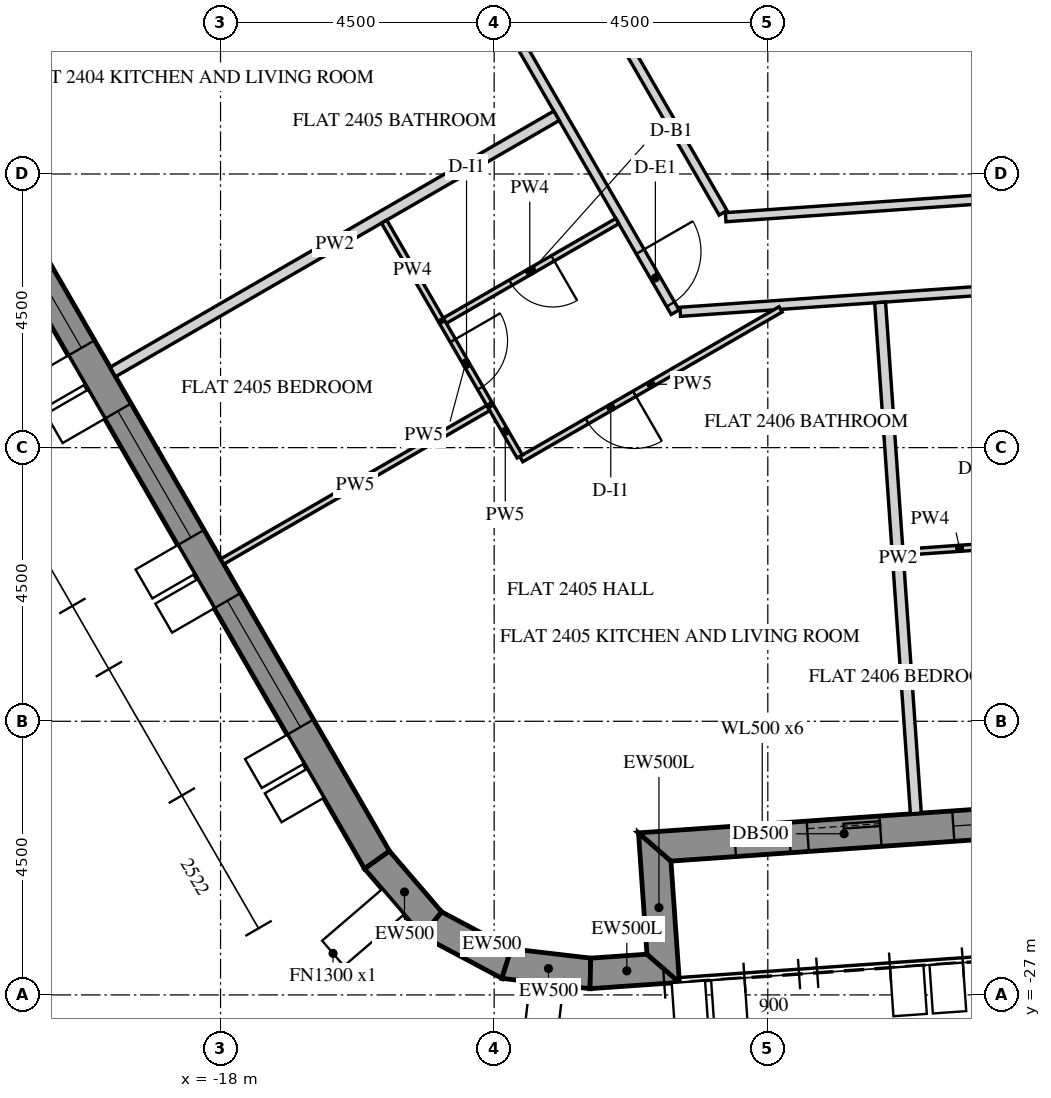
"""IFC4 building model, lengths in metres.
Left out: names, types, materials, properties, quantities, classifications, styles, units other than length and angle.
Written with IfcOpenShell. Run it as: python <this file> out.ifc"""

import sys

from ifc_helpers import new_model, si_unit, direction, frame, frame_2d, origin, place, context, subcontext, project, spatial, polyline, rectangle, outline, extrude, element, fill, save


model = new_model("IFC4")
c1 = context("Model", 3, precision=1e-05, world=origin(), true_north=direction((0.0, 1.0)))
c2 = subcontext(c1, "Body", "Model", "MODEL_VIEW")
j1 = project(units=[si_unit("LENGTHUNIT", "METRE"), si_unit("PLANEANGLEUNIT", "RADIAN")], contexts=[c1])
p1 = place(None, origin())
s1 = spatial("IfcSite", under=j1, at=p1, CompositionType="ELEMENT")
p2 = place(p1, origin())
s2 = spatial("IfcBuilding", under=s1, at=p2, CompositionType="ELEMENT")
p3 = place(p2, frame((0.0, 0.0, 303.0)))
s3 = spatial("IfcBuildingStorey", under=s2, at=p3, CompositionType="ELEMENT", Elevation=303.0)
p4 = place(p3, frame((-28.149, -2.745, -0.15), z_axis=(0.0, 0.0, 1.0), x_axis=(0.500003737743, -0.866023245787, 0.0)))
e1 = element("IfcWall", 1, at=p4, inside=s3, PredefinedType="SOLIDWALL", context=c2, shape_type="SweptSolid", body=[
    extrude(outline(polyline([(-0.021, -0.25), (25.468, -0.25), (25.421, 0.25), (0.021, 0.25), (-0.021, -0.25)])), origin(), (0.0, 0.0, 1.0), 3.9),
])
p5 = place(p4, frame((2.522, 0.0, 0.75)))
e2 = element("IfcOpeningElement", 2, at=p5, cuts=e1, PredefinedType="OPENING", context=c2, shape_type="SweptSolid", body=[
    extrude(rectangle(XDim=2.4, YDim=2.7, at=frame_2d((1.2, 1.35))), frame((0.0, 0.26, 0.0), z_axis=(0.0, -1.0, 0.0), x_axis=(1.0, 0.0, 0.0)), (0.0, 0.0, 1.0), 0.52),
])
p6 = place(p4, frame((6.122, 0.0, 0.75)))
e3 = element("IfcOpeningElement", 3, at=p6, cuts=e1, PredefinedType="OPENING", context=c2, shape_type="SweptSolid", body=[
    extrude(rectangle(XDim=2.4, YDim=2.7, at=frame_2d((1.2, 1.35))), frame((0.0, 0.26, 0.0), z_axis=(0.0, -1.0, 0.0), x_axis=(1.0, 0.0, 0.0)), (0.0, 0.0, 1.0), 0.52),
])
p7 = place(p4, frame((9.722, 0.0, 0.75)))
e4 = element("IfcOpeningElement", 4, at=p7, cuts=e1, PredefinedType="OPENING", context=c2, shape_type="SweptSolid", body=[
    extrude(rectangle(XDim=2.4, YDim=2.7, at=frame_2d((1.2, 1.35))), frame((0.0, 0.26, 0.0), z_axis=(0.0, -1.0, 0.0), x_axis=(1.0, 0.0, 0.0)), (0.0, 0.0, 1.0), 0.52),
])
p8 = place(p4, frame((13.323, 0.0, 0.75)))
e5 = element("IfcOpeningElement", 5, at=p8, cuts=e1, PredefinedType="OPENING", context=c2, shape_type="SweptSolid", body=[
    extrude(rectangle(XDim=2.4, YDim=2.7, at=frame_2d((1.2, 1.35))), frame((0.0, 0.26, 0.0), z_axis=(0.0, -1.0, 0.0), x_axis=(1.0, 0.0, 0.0)), (0.0, 0.0, 1.0), 0.52),
])
p9 = place(p4, frame((16.922, 0.0, 0.75)))
e6 = element("IfcOpeningElement", 6, at=p9, cuts=e1, PredefinedType="OPENING", context=c2, shape_type="SweptSolid", body=[
    extrude(rectangle(XDim=2.4, YDim=2.7, at=frame_2d((1.2, 1.35))), frame((0.0, 0.26, 0.0), z_axis=(0.0, -1.0, 0.0), x_axis=(1.0, 0.0, 0.0)), (0.0, 0.0, 1.0), 0.52),
])
p10 = place(p4, frame((20.522, 0.0, 0.75)))
e7 = element("IfcOpeningElement", 7, at=p10, cuts=e1, PredefinedType="OPENING", context=c2, shape_type="SweptSolid", body=[
    extrude(rectangle(XDim=2.4, YDim=2.7, at=frame_2d((1.2, 1.35))), frame((0.0, 0.26, 0.0), z_axis=(0.0, -1.0, 0.0), x_axis=(1.0, 0.0, 0.0)), (0.0, 0.0, 1.0), 0.52),
])
p11 = place(p3, frame((-15.427, -24.78, -0.15), z_axis=(0.0, 0.0, 1.0), x_axis=(0.651616566281, -0.758548515619, 0.0)))
e8 = element("IfcWall", 8, at=p11, inside=s3, PredefinedType="SOLIDWALL", context=c2, shape_type="SweptSolid", body=[
    extrude(outline(polyline([(-0.023, -0.25), (1.435, -0.25), (1.341, 0.25), (0.023, 0.25), (-0.023, -0.25)])), origin(), (0.0, 0.0, 1.0), 3.9),
])
p12 = place(p3, frame((-14.522, -25.833, -0.15), z_axis=(0.0, 0.0, 1.0), x_axis=(0.882926676147, -0.469510899286, 0.0)))
e9 = element("IfcWall", 9, at=p12, inside=s3, PredefinedType="SOLIDWALL", context=c2, shape_type="SweptSolid", body=[
    extrude(outline(polyline([(-0.047, -0.25), (1.436, -0.25), (1.341, 0.25), (0.047, 0.25), (-0.047, -0.25)])), origin(), (0.0, 0.0, 1.0), 3.9),
])
p13 = place(p3, frame((-13.296, -26.485, -0.15), z_axis=(0.0, 0.0, 1.0), x_axis=(0.993239161627, -0.116086036245, 0.0)))
e10 = element("IfcWall", 10, at=p13, inside=s3, PredefinedType="SOLIDWALL", context=c2, shape_type="SweptSolid", body=[
    extrude(outline(polyline([(-0.047, -0.25), (1.411, -0.25), (1.365, 0.25), (0.047, 0.25), (-0.047, -0.25)])), origin(), (0.0, 0.0, 1.0), 3.9),
])
p14 = place(p3, frame((-11.917, -26.646, -0.15), z_axis=(0.0, 0.0, 1.0), x_axis=(0.997562933087, 0.069772448216, 0.0)))
e11 = element("IfcWall", 11, at=p14, inside=s3, PredefinedType="SOLIDWALL", context=c2, shape_type="SweptSolid", body=[
    extrude(outline(polyline([(-0.023, -0.25), (1.45, -0.25), (0.95, 0.25), (0.023, 0.25), (-0.023, -0.25)])), origin(), (0.0, 0.0, 1.0), 3.9),
])
p15 = place(p3, frame((-10.72, -26.562, -0.15), z_axis=(0.0, 0.0, 1.0), x_axis=(-0.069824268692, 0.99755930726, 0.0)))
e12 = element("IfcWall", 12, at=p15, inside=s3, PredefinedType="SOLIDWALL", context=c2, shape_type="SweptSolid", body=[
    extrude(outline(polyline([(-0.25, -0.25), (1.75, -0.25), (2.25, 0.25), (0.25, 0.25), (-0.25, -0.25)])), origin(), (0.0, 0.0, 1.0), 3.9),
])
p16 = place(p3, frame((-10.86, -24.567, -0.15), z_axis=(0.0, 0.0, 1.0), x_axis=(0.997564329317, 0.06975248292, 0.0)))
e13 = element("IfcWall", 13, at=p16, inside=s3, PredefinedType="SOLIDWALL", context=c2, shape_type="SweptSolid", body=[
    extrude(outline(polyline([(0.25, -0.25), (22.795, -0.25), (23.295, 0.25), (-0.25, 0.25), (0.25, -0.25)])), origin(), (0.0, 0.0, 1.0), 3.9),
])
p17 = place(p16, frame((1.323, 0.0, 1.05)))
e14 = element("IfcOpeningElement", 14, at=p17, cuts=e13, PredefinedType="OPENING", context=c2, shape_type="SweptSolid", body=[
    extrude(rectangle(XDim=0.9, YDim=1.5, at=frame_2d((0.45, 0.75))), frame((0.0, 0.26, 0.0), z_axis=(0.0, -1.0, 0.0), x_axis=(1.0, 0.0, 0.0)), (0.0, 0.0, 1.0), 0.52),
])
p18 = place(p16, frame((2.522, 0.0, 0.15)))
e15 = element("IfcOpeningElement", 15, at=p18, cuts=e13, PredefinedType="OPENING", context=c2, shape_type="SweptSolid", body=[
    extrude(rectangle(XDim=1.2, YDim=2.4, at=frame_2d((0.6, 1.2))), frame((0.0, 0.26, 0.0), z_axis=(0.0, -1.0, 0.0), x_axis=(1.0, 0.0, 0.0)), (0.0, 0.0, 1.0), 0.52),
])
p19 = place(p16, frame((4.922, 0.0, 1.05)))
e16 = element("IfcOpeningElement", 16, at=p19, cuts=e13, PredefinedType="OPENING", context=c2, shape_type="SweptSolid", body=[
    extrude(rectangle(XDim=0.9, YDim=1.5, at=frame_2d((0.45, 0.75))), frame((0.0, 0.26, 0.0), z_axis=(0.0, -1.0, 0.0), x_axis=(1.0, 0.0, 0.0)), (0.0, 0.0, 1.0), 0.52),
])
p20 = place(p16, frame((6.122, 0.0, 0.15)))
e17 = element("IfcOpeningElement", 17, at=p20, cuts=e13, PredefinedType="OPENING", context=c2, shape_type="SweptSolid", body=[
    extrude(rectangle(XDim=1.2, YDim=2.4, at=frame_2d((0.6, 1.2))), frame((0.0, 0.26, 0.0), z_axis=(0.0, -1.0, 0.0), x_axis=(1.0, 0.0, 0.0)), (0.0, 0.0, 1.0), 0.52),
])
p21 = place(p16, frame((8.522, 0.0, 1.05)))
e18 = element("IfcOpeningElement", 18, at=p21, cuts=e13, PredefinedType="OPENING", context=c2, shape_type="SweptSolid", body=[
    extrude(rectangle(XDim=0.9, YDim=1.5, at=frame_2d((0.45, 0.75))), frame((0.0, 0.26, 0.0), z_axis=(0.0, -1.0, 0.0), x_axis=(1.0, 0.0, 0.0)), (0.0, 0.0, 1.0), 0.52),
])
p22 = place(p16, frame((9.722, 0.0, 0.15)))
e19 = element("IfcOpeningElement", 19, at=p22, cuts=e13, PredefinedType="OPENING", context=c2, shape_type="SweptSolid", body=[
    extrude(rectangle(XDim=1.2, YDim=2.4, at=frame_2d((0.6, 1.2))), frame((0.0, 0.26, 0.0), z_axis=(0.0, -1.0, 0.0), x_axis=(1.0, 0.0, 0.0)), (0.0, 0.0, 1.0), 0.52),
])
p23 = place(p16, frame((12.122, 0.0, 1.05)))
e20 = element("IfcOpeningElement", 20, at=p23, cuts=e13, PredefinedType="OPENING", context=c2, shape_type="SweptSolid", body=[
    extrude(rectangle(XDim=0.9, YDim=1.5, at=frame_2d((0.45, 0.75))), frame((0.0, 0.26, 0.0), z_axis=(0.0, -1.0, 0.0), x_axis=(1.0, 0.0, 0.0)), (0.0, 0.0, 1.0), 0.52),
])
p24 = place(p16, frame((13.323, 0.0, 0.15)))
e21 = element("IfcOpeningElement", 21, at=p24, cuts=e13, PredefinedType="OPENING", context=c2, shape_type="SweptSolid", body=[
    extrude(rectangle(XDim=1.2, YDim=2.4, at=frame_2d((0.6, 1.2))), frame((0.0, 0.26, 0.0), z_axis=(0.0, -1.0, 0.0), x_axis=(1.0, 0.0, 0.0)), (0.0, 0.0, 1.0), 0.52),
])
p25 = place(p16, frame((15.722, 0.0, 1.05)))
e22 = element("IfcOpeningElement", 22, at=p25, cuts=e13, PredefinedType="OPENING", context=c2, shape_type="SweptSolid", body=[
    extrude(rectangle(XDim=0.9, YDim=1.5, at=frame_2d((0.45, 0.75))), frame((0.0, 0.26, 0.0), z_axis=(0.0, -1.0, 0.0), x_axis=(1.0, 0.0, 0.0)), (0.0, 0.0, 1.0), 0.52),
])
p26 = place(p16, frame((16.922, 0.0, 0.15)))
e23 = element("IfcOpeningElement", 23, at=p26, cuts=e13, PredefinedType="OPENING", context=c2, shape_type="SweptSolid", body=[
    extrude(rectangle(XDim=1.2, YDim=2.4, at=frame_2d((0.6, 1.2))), frame((0.0, 0.26, 0.0), z_axis=(0.0, -1.0, 0.0), x_axis=(1.0, 0.0, 0.0)), (0.0, 0.0, 1.0), 0.52),
])
p27 = place(p16, frame((19.323, 0.0, 1.05)))
e24 = element("IfcOpeningElement", 24, at=p27, cuts=e13, PredefinedType="OPENING", context=c2, shape_type="SweptSolid", body=[
    extrude(rectangle(XDim=0.9, YDim=1.5, at=frame_2d((0.45, 0.75))), frame((0.0, 0.26, 0.0), z_axis=(0.0, -1.0, 0.0), x_axis=(1.0, 0.0, 0.0)), (0.0, 0.0, 1.0), 0.52),
])
p28 = place(p16, frame((20.522, 0.0, 0.15)))
e25 = element("IfcOpeningElement", 25, at=p28, cuts=e13, PredefinedType="OPENING", context=c2, shape_type="SweptSolid", body=[
    extrude(rectangle(XDim=1.2, YDim=2.4, at=frame_2d((0.6, 1.2))), frame((0.0, 0.26, 0.0), z_axis=(0.0, -1.0, 0.0), x_axis=(1.0, 0.0, 0.0)), (0.0, 0.0, 1.0), 0.52),
])
p29 = place(p3, frame((-18.036, -2.761, 0.0), z_axis=(0.0, 0.0, 1.0), x_axis=(0.499996279807, -0.866027551628, 0.0)))
e26 = element("IfcWall", 26, at=p29, inside=s3, PredefinedType="PARTITIONING", context=c2, shape_type="SweptSolid", body=[
    extrude(rectangle(XDim=15.024, YDim=0.15, at=frame_2d((7.512, 0.0))), origin(), (0.0, 0.0, 1.0), 2.988),
])
p30 = place(p29, frame((0.8, 0.0, 0.0)))
e27 = element("IfcOpeningElement", 27, at=p30, cuts=e26, PredefinedType="OPENING", context=c2, shape_type="SweptSolid", body=[
    extrude(rectangle(XDim=1.0, YDim=2.1, at=frame_2d((0.5, 1.05))), frame((0.0, 0.085, 0.0), z_axis=(0.0, -1.0, 0.0), x_axis=(1.0, 0.0, 0.0)), (0.0, 0.0, 1.0), 0.17),
])
p31 = place(p29, frame((13.874, 0.0, 0.0)))
e28 = element("IfcOpeningElement", 28, at=p31, cuts=e26, PredefinedType="OPENING", context=c2, shape_type="SweptSolid", body=[
    extrude(rectangle(XDim=1.0, YDim=2.1, at=frame_2d((0.5, 1.05))), frame((0.0, 0.085, 0.0), z_axis=(0.0, -1.0, 0.0), x_axis=(1.0, 0.0, 0.0)), (0.0, 0.0, 1.0), 0.17),
])
p32 = place(p3, frame((-10.44, -15.767, 0.0), z_axis=(0.0, 0.0, 1.0), x_axis=(0.997565037323, 0.069742356651, 0.0)))
e29 = element("IfcWall", 29, at=p32, inside=s3, PredefinedType="PARTITIONING", context=c2, shape_type="SweptSolid", body=[
    extrude(rectangle(XDim=16.939, YDim=0.15, at=frame_2d((8.47, 0.0))), origin(), (0.0, 0.0, 1.0), 2.988),
])
p33 = place(p32, frame((6.09, 0.0, 0.0)))
e30 = element("IfcOpeningElement", 30, at=p33, cuts=e29, PredefinedType="OPENING", context=c2, shape_type="SweptSolid", body=[
    extrude(rectangle(XDim=1.0, YDim=2.1, at=frame_2d((0.5, 1.05))), frame((0.0, 0.085, 0.0), z_axis=(0.0, -1.0, 0.0), x_axis=(1.0, 0.0, 0.0)), (0.0, 0.0, 1.0), 0.17),
])
p34 = place(p32, frame((15.39, 0.0, 0.0)))
e31 = element("IfcOpeningElement", 31, at=p34, cuts=e29, PredefinedType="OPENING", context=c2, shape_type="SweptSolid", body=[
    extrude(rectangle(XDim=1.0, YDim=2.1, at=frame_2d((0.5, 1.05))), frame((0.0, 0.085, 0.0), z_axis=(0.0, -1.0, 0.0), x_axis=(1.0, 0.0, 0.0)), (0.0, 0.0, 1.0), 0.17),
])
p35 = place(p3, frame((6.884, -13.052, 0.0), z_axis=(0.0, 0.0, 1.0), x_axis=(-0.997564224443, -0.069753982764, 0.0)))
e32 = element("IfcWall", 32, at=p35, inside=s3, PredefinedType="PARTITIONING", context=c2, shape_type="SweptSolid", body=[
    extrude(rectangle(XDim=16.618, YDim=0.15, at=frame_2d((8.309, 0.0))), origin(), (0.0, 0.0, 1.0), 2.988),
])
p36 = place(p35, frame((7.859, 0.0, 0.0)))
e33 = element("IfcOpeningElement", 33, at=p36, cuts=e32, PredefinedType="OPENING", context=c2, shape_type="SweptSolid", body=[
    extrude(rectangle(XDim=0.9, YDim=2.1, at=frame_2d((0.45, 1.05))), frame((0.0, 0.085, 0.0), z_axis=(0.0, -1.0, 0.0), x_axis=(1.0, 0.0, 0.0)), (0.0, 0.0, 1.0), 0.17),
])
p37 = place(p3, frame((-9.735, -14.138, 0.0), z_axis=(0.0, 0.0, 1.0), x_axis=(-0.500018385592, 0.866014788598, 0.0)))
e34 = element("IfcWall", 34, at=p37, inside=s3, PredefinedType="PARTITIONING", context=c2, shape_type="SweptSolid", body=[
    extrude(rectangle(XDim=6.356, YDim=0.15, at=frame_2d((3.178, 0.0))), origin(), (0.0, 0.0, 1.0), 2.988),
])
p38 = place(p3, frame((-19.771, -16.755, 0.0), z_axis=(0.0, 0.0, 1.0), x_axis=(0.866026819143, 0.499997548519, 0.0)))
e35 = element("IfcWall", 35, at=p38, inside=s3, PredefinedType="PARTITIONING", context=c2, shape_type="SweptSolid", body=[
    extrude(rectangle(XDim=8.425, YDim=0.18, at=frame_2d((4.212, 0.0))), origin(), (0.0, 0.0, 1.0), 2.988),
])
p39 = place(p3, frame((-8.789, -15.726, 0.0), z_axis=(0.0, 0.0, 1.0), x_axis=(-0.866010575439, -0.500025682568, 0.0)))
e36 = element("IfcWall", 36, at=p39, inside=s3, PredefinedType="PARTITIONING", context=c2, shape_type="SweptSolid", body=[
    extrude(rectangle(XDim=4.925, YDim=0.1, at=frame_2d((2.462, 0.0))), origin(), (0.0, 0.0, 1.0), 2.988),
])
p40 = place(p39, frame((2.775, 0.0, 0.0)))
e37 = element("IfcOpeningElement", 37, at=p40, cuts=e36, PredefinedType="OPENING", context=c2, shape_type="SweptSolid", body=[
    extrude(rectangle(XDim=0.9, YDim=2.1, at=frame_2d((0.45, 1.05))), frame((0.0, 0.06, 0.0), z_axis=(0.0, -1.0, 0.0), x_axis=(1.0, 0.0, 0.0)), (0.0, 0.0, 1.0), 0.12),
])
p41 = place(p3, frame((-13.08, -18.146, 0.0), z_axis=(0.0, 0.0, 1.0), x_axis=(-0.49986306505, 0.866104448781, 0.0)))
e38 = element("IfcWall", 38, at=p41, inside=s3, PredefinedType="PARTITIONING", context=c2, shape_type="SweptSolid", body=[
    extrude(rectangle(XDim=0.952, YDim=0.1, at=frame_2d((0.476, 0.0))), origin(), (0.0, 0.0, 1.0), 2.988),
])
p42 = place(p3, frame((-13.598, -17.348, 0.0), z_axis=(0.0, 0.0, 1.0), x_axis=(-0.866026981659, -0.499997267031, 0.0)))
e39 = element("IfcWall", 39, at=p42, inside=s3, PredefinedType="PARTITIONING", context=c2, shape_type="SweptSolid", body=[
    extrude(rectangle(XDim=5.05, YDim=0.1, at=frame_2d((2.525, 0.0))), origin(), (0.0, 0.0, 1.0), 2.988),
])
p43 = place(p3, frame((-6.565, -24.017, 0.0), z_axis=(0.0, 0.0, 1.0), x_axis=(-0.069749826803, 0.997564515037, 0.0)))
e40 = element("IfcWall", 40, at=p43, inside=s3, PredefinedType="PARTITIONING", context=c2, shape_type="SweptSolid", body=[
    extrude(rectangle(XDim=8.425, YDim=0.18, at=frame_2d((4.212, 0.0))), origin(), (0.0, 0.0, 1.0), 2.988),
])
p44 = place(p3, frame((-11.475, -14.275, 0.0), z_axis=(0.0, 0.0, 1.0), x_axis=(-0.866002163101, -0.500040251884, 0.0)))
e41 = element("IfcWall", 41, at=p44, inside=s3, PredefinedType="PARTITIONING", context=c2, shape_type="SweptSolid", body=[
    extrude(rectangle(XDim=3.325, YDim=0.1, at=frame_2d((1.663, 0.0))), origin(), (0.0, 0.0, 1.0), 2.988),
])
p45 = place(p44, frame((1.225, 0.0, 0.0)))
e42 = element("IfcOpeningElement", 42, at=p45, cuts=e41, PredefinedType="OPENING", context=c2, shape_type="SweptSolid", body=[
    extrude(rectangle(XDim=0.8, YDim=2.1, at=frame_2d((0.4, 1.05))), frame((0.0, 0.06, 0.0), z_axis=(0.0, -1.0, 0.0), x_axis=(1.0, 0.0, 0.0)), (0.0, 0.0, 1.0), 0.12),
])
p46 = place(p3, frame((-14.355, -15.936, 0.0), z_axis=(0.0, 0.0, 1.0), x_axis=(0.499963041308, -0.866046740844, 0.0)))
e43 = element("IfcWall", 43, at=p46, inside=s3, PredefinedType="PARTITIONING", context=c2, shape_type="SweptSolid", body=[
    extrude(rectangle(XDim=1.552, YDim=0.1, at=frame_2d((0.776, 0.0))), origin(), (0.0, 0.0, 1.0), 2.988),
])
p47 = place(p46, frame((0.352, 0.0, 0.0)))
e44 = element("IfcOpeningElement", 44, at=p47, cuts=e43, PredefinedType="OPENING", context=c2, shape_type="SweptSolid", body=[
    extrude(rectangle(XDim=0.9, YDim=2.1, at=frame_2d((0.45, 1.05))), frame((0.0, 0.06, 0.0), z_axis=(0.0, -1.0, 0.0), x_axis=(1.0, 0.0, 0.0)), (0.0, 0.0, 1.0), 0.12),
])
for number, where, z_axis, x_axis in (
    (45, (-15.31, -14.283, 0.0), (0.0, 0.0, 1.0), (0.5, -0.866, 0.0)),
    (46, (-6.776, -19.721, 0.0), (0.0, 0.0, 1.0), (0.998, 0.07, 0.0)),
):
    element("IfcWall", number, at=place(p3, frame(where, z_axis=z_axis, x_axis=x_axis)), inside=s3, PredefinedType="PARTITIONING", context=c2, shape_type="SweptSolid", body=[
        extrude(rectangle(XDim=1.862, YDim=0.1, at=frame_2d((0.931, 0.0))), origin(), (0.0, 0.0, 1.0), 2.988),
    ])
p48 = place(p8, frame((0.0, 0.18, 0.0)))
e47 = element("IfcWindow", 47, at=p48, inside=s3, PartitioningType="DOUBLE_PANEL_VERTICAL", PredefinedType="WINDOW", context=c2, shape_type="SweptSolid", body=[
    extrude(rectangle(XDim=2.4, YDim=2.7, at=frame_2d((1.2, 1.35))), frame((0.0, 0.03, 0.0), z_axis=(0.0, -1.0, 0.0), x_axis=(1.0, 0.0, 0.0)), (0.0, 0.0, 1.0), 0.06),
])
fill(e5, e47)
p49 = place(p9, frame((0.0, 0.18, 0.0)))
e48 = element("IfcWindow", 48, at=p49, inside=s3, PartitioningType="DOUBLE_PANEL_VERTICAL", PredefinedType="WINDOW", context=c2, shape_type="SweptSolid", body=[
    extrude(rectangle(XDim=2.4, YDim=2.7, at=frame_2d((1.2, 1.35))), frame((0.0, 0.03, 0.0), z_axis=(0.0, -1.0, 0.0), x_axis=(1.0, 0.0, 0.0)), (0.0, 0.0, 1.0), 0.06),
])
fill(e6, e48)
p50 = place(p10, frame((0.0, 0.18, 0.0)))
e49 = element("IfcWindow", 49, at=p50, inside=s3, PartitioningType="DOUBLE_PANEL_VERTICAL", PredefinedType="WINDOW", context=c2, shape_type="SweptSolid", body=[
    extrude(rectangle(XDim=2.4, YDim=2.7, at=frame_2d((1.2, 1.35))), frame((0.0, 0.03, 0.0), z_axis=(0.0, -1.0, 0.0), x_axis=(1.0, 0.0, 0.0)), (0.0, 0.0, 1.0), 0.06),
])
fill(e7, e49)
p51 = place(p17, frame((0.0, 0.18, 0.0)))
e50 = element("IfcWindow", 50, at=p51, inside=s3, PartitioningType="SINGLE_PANEL", PredefinedType="WINDOW", context=c2, shape_type="SweptSolid", body=[
    extrude(rectangle(XDim=0.9, YDim=1.5, at=frame_2d((0.45, 0.75))), frame((0.0, 0.03, 0.0), z_axis=(0.0, -1.0, 0.0), x_axis=(1.0, 0.0, 0.0)), (0.0, 0.0, 1.0), 0.06),
])
fill(e14, e50)
p52 = place(p18, frame((0.0, 0.175, 0.0)))
e51 = element("IfcDoor", 51, at=p52, inside=s3, OperationType="SLIDING_TO_LEFT", PredefinedType="DOOR", context=c2, shape_type="SweptSolid", body=[
    extrude(rectangle(XDim=1.2, YDim=2.4, at=frame_2d((0.6, 1.2))), frame((0.0, 0.025, 0.0), z_axis=(0.0, -1.0, 0.0), x_axis=(1.0, 0.0, 0.0)), (0.0, 0.0, 1.0), 0.05),
])
fill(e15, e51)
p53 = place(p19, frame((0.0, 0.18, 0.0)))
e52 = element("IfcWindow", 52, at=p53, inside=s3, PartitioningType="SINGLE_PANEL", PredefinedType="WINDOW", context=c2, shape_type="SweptSolid", body=[
    extrude(rectangle(XDim=0.9, YDim=1.5, at=frame_2d((0.45, 0.75))), frame((0.0, 0.03, 0.0), z_axis=(0.0, -1.0, 0.0), x_axis=(1.0, 0.0, 0.0)), (0.0, 0.0, 1.0), 0.06),
])
fill(e16, e52)
p54 = place(p31, origin())
e53 = element("IfcDoor", 53, at=p54, inside=s3, OperationType="SINGLE_SWING_LEFT", PredefinedType="DOOR", context=c2, shape_type="SweptSolid", body=[
    extrude(rectangle(XDim=1.0, YDim=2.1, at=frame_2d((0.5, 1.05))), frame((0.0, 0.025, 0.0), z_axis=(0.0, -1.0, 0.0), x_axis=(1.0, 0.0, 0.0)), (0.0, 0.0, 1.0), 0.05),
])
fill(e28, e53)
p55 = place(p45, origin())
e54 = element("IfcDoor", 54, at=p55, inside=s3, OperationType="SINGLE_SWING_RIGHT", PredefinedType="DOOR", context=c2, shape_type="SweptSolid", body=[
    extrude(rectangle(XDim=0.8, YDim=2.1, at=frame_2d((0.4, 1.05))), frame((0.0, 0.025, 0.0), z_axis=(0.0, -1.0, 0.0), x_axis=(1.0, 0.0, 0.0)), (0.0, 0.0, 1.0), 0.05),
])
fill(e42, e54)
p56 = place(p40, origin())
e55 = element("IfcDoor", 55, at=p56, inside=s3, OperationType="SINGLE_SWING_LEFT", PredefinedType="DOOR", context=c2, shape_type="SweptSolid", body=[
    extrude(rectangle(XDim=0.9, YDim=2.1, at=frame_2d((0.45, 1.05))), frame((0.0, 0.025, 0.0), z_axis=(0.0, -1.0, 0.0), x_axis=(1.0, 0.0, 0.0)), (0.0, 0.0, 1.0), 0.05),
])
fill(e37, e55)
p57 = place(p47, origin())
e56 = element("IfcDoor", 56, at=p57, inside=s3, OperationType="SINGLE_SWING_LEFT", PredefinedType="DOOR", context=c2, shape_type="SweptSolid", body=[
    extrude(rectangle(XDim=0.9, YDim=2.1, at=frame_2d((0.45, 1.05))), frame((0.0, 0.025, 0.0), z_axis=(0.0, -1.0, 0.0), x_axis=(1.0, 0.0, 0.0)), (0.0, 0.0, 1.0), 0.05),
])
fill(e44, e56)
save(model, sys.argv[1])
